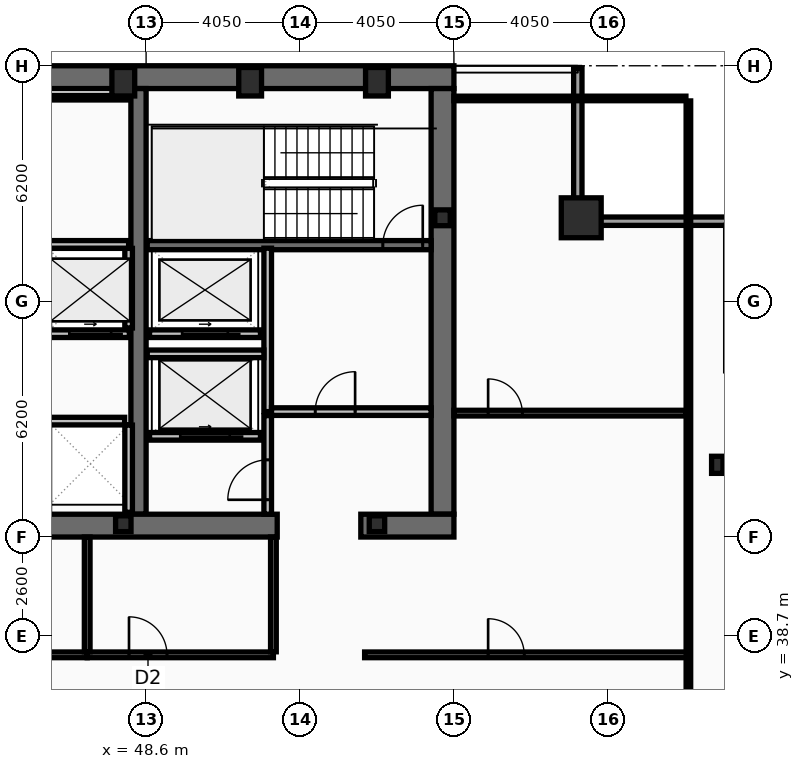
"""IFC4 building model, lengths in metres.
Left out: names, types, materials, properties, quantities, classifications, styles, units other than length and angle.
Written with IfcOpenShell. Run it as: python <this file> out.ifc"""

import sys

from ifc_helpers import new_model, si_unit, direction, frame, frame_2d, origin, origin_2d, place, context, subcontext, project, spatial, rectangle, hollow_rectangle, i_section, extrude, element, fill, save


model = new_model("IFC4")
c1 = context("Model", 3, precision=1e-05, world=origin(), true_north=direction((0.0, 1.0)))
c2 = subcontext(c1, "Body", "Model", "MODEL_VIEW")
j1 = project(units=[si_unit("LENGTHUNIT", "METRE"), si_unit("PLANEANGLEUNIT", "RADIAN")], contexts=[c1])
p1 = place(None, origin())
s1 = spatial("IfcSite", under=j1, at=p1, CompositionType="ELEMENT")
p2 = place(p1, origin())
s2 = spatial("IfcBuilding", under=s1, at=p2, CompositionType="ELEMENT")
p3 = place(p2, frame((0.0, 0.0, 253.4)))
s3 = spatial("IfcBuildingStorey", under=s2, at=p3, CompositionType="ELEMENT", Elevation=253.4)
p4 = place(p3, frame((16.2, 53.4, 0.0), z_axis=(0.0, 0.0, 1.0), x_axis=(1.0, 0.0, 0.0)))
e1 = element("IfcWall", 1, at=p4, inside=s3, PredefinedType="SHEAR", context=c2, shape_type="SweptSolid", body=[
    extrude(rectangle(XDim=40.5, YDim=0.6, at=frame_2d((20.25, 0.0))), origin(), (0.0, 0.0, 1.0), 3.38),
])
p5 = place(p3, frame((56.4, 53.1, 0.0), z_axis=(0.0, 0.0, 1.0), x_axis=(0.0, -1.0, 0.0)))
e2 = element("IfcWall", 2, at=p5, inside=s3, PredefinedType="SHEAR", context=c2, shape_type="SweptSolid", body=[
    extrude(rectangle(XDim=11.2, YDim=0.6, at=frame_2d((5.6, 0.0))), origin(), (0.0, 0.0, 1.0), 3.38),
])
p6 = place(p3, frame((48.4, 41.9, 0.0), z_axis=(0.0, 0.0, 1.0), x_axis=(0.0, 1.0, 0.0)))
e3 = element("IfcWall", 3, at=p6, inside=s3, PredefinedType="SHEAR", context=c2, shape_type="SweptSolid", body=[
    extrude(rectangle(XDim=11.2, YDim=0.4, at=frame_2d((5.6, 0.0))), origin(), (0.0, 0.0, 1.0), 3.38),
])
p7 = place(p3, frame((52.05, 41.6, 0.0), z_axis=(0.0, 0.0, 1.0), x_axis=(-1.0, 0.0, 0.0)))
e4 = element("IfcWall", 4, at=p7, inside=s3, PredefinedType="SHEAR", context=c2, shape_type="SweptSolid", body=[
    extrude(rectangle(XDim=11.3, YDim=0.6, at=frame_2d((5.65, 0.0))), origin(), (0.0, 0.0, 1.0), 3.38),
])
p8 = place(p3, frame((56.7, 41.6, 0.0), z_axis=(0.0, 0.0, 1.0), x_axis=(-1.0, 0.0, 0.0)))
e5 = element("IfcWall", 5, at=p8, inside=s3, PredefinedType="SHEAR", context=c2, shape_type="SweptSolid", body=[
    extrude(rectangle(XDim=2.45, YDim=0.6, at=frame_2d((1.225, 0.0))), origin(), (0.0, 0.0, 1.0), 3.38),
])
p9 = place(p3, frame((48.63, 48.98, 0.0), z_axis=(0.0, 0.0, 1.0), x_axis=(1.0, 0.0, 0.0)))
e6 = element("IfcWall", 6, at=p9, inside=s3, PredefinedType="SHEAR", context=c2, shape_type="SweptSolid", body=[
    extrude(rectangle(XDim=7.47, YDim=0.24, at=frame_2d((3.735, 0.0))), origin(), (0.0, 0.0, 1.0), 3.38),
])
p10 = place(p9, frame((6.2, 0.0, 0.0)))
e7 = element("IfcOpeningElement", 7, at=p10, cuts=e6, PredefinedType="OPENING", context=c2, shape_type="SweptSolid", body=[
    extrude(rectangle(XDim=1.05, YDim=2.15, at=frame_2d((0.525, 1.075))), frame((0.0, 0.13, 0.0), z_axis=(0.0, -1.0, 0.0), x_axis=(1.0, 0.0, 0.0)), (0.0, 0.0, 1.0), 0.26),
])
p11 = place(p3, frame((60.05, 49.7, 0.0), z_axis=(0.0, 0.0, 1.0), x_axis=(1.0, 0.0, 0.0)))
e8 = element("IfcColumn", 8, at=p11, inside=s3, PredefinedType="COLUMN", context=c2, shape_type="SweptSolid", body=[
    extrude(hollow_rectangle(XDim=1.05, YDim=1.05, WallThickness=0.055, at=origin_2d()), origin(), (0.0, 0.0, 1.0), 3.6),
])
for number, where, z_axis, x_axis in (
    (9, (48.0, 53.28, 0.0), (0.0, 0.0, 1.0), (1.0, 0.0, 0.0)),
    (10, (51.337, 53.28, 0.0), (0.0, 0.0, 1.0), (1.0, 0.0, 0.0)),
    (11, (54.675, 53.28, 0.0), (0.0, 0.0, 1.0), (1.0, 0.0, 0.0)),
):
    element("IfcColumn", number, at=place(p3, frame(where, z_axis=z_axis, x_axis=x_axis)), inside=s3, PredefinedType="COLUMN", context=c2, shape_type="SweptSolid", body=[
        extrude(hollow_rectangle(XDim=0.6, YDim=0.75, WallThickness=0.045, at=origin_2d()), origin(), (0.0, 0.0, 1.0), 3.6),
    ])
p12 = place(p3, frame((63.63, 43.2, 0.0), z_axis=(0.0, 0.0, 1.0), x_axis=(1.0, 0.0, 0.0)))
e12 = element("IfcColumn", 12, at=p12, inside=s3, PredefinedType="COLUMN", context=c2, shape_type="SweptSolid", body=[
    extrude(i_section(OverallWidth=0.3, OverallDepth=0.45, WebThickness=0.014, FlangeThickness=0.026, at=origin_2d()), origin(), (0.0, 0.0, 1.0), 3.6),
])
for number, where, z_axis, x_axis in (
    (13, (56.4, 49.7, 0.0), (0.0, 0.0, 1.0), (1.0, 0.0, 0.0)),
    (14, (48.0, 41.65, 0.0), (0.0, 0.0, 1.0), (1.0, 0.0, 0.0)),
    (15, (54.675, 41.65, 0.0), (0.0, 0.0, 1.0), (1.0, 0.0, 0.0)),
):
    element("IfcColumn", number, at=place(p3, frame(where, z_axis=z_axis, x_axis=x_axis)), inside=s3, PredefinedType="COLUMN", context=c2, shape_type="SweptSolid", body=[
        extrude(i_section(OverallWidth=0.406, OverallDepth=0.416, WebThickness=0.03, FlangeThickness=0.048, at=origin_2d()), origin(), (0.0, 0.0, 1.0), 3.6),
    ])
p13 = place(p3, frame((59.96, 53.63, 0.0), z_axis=(0.0, 0.0, 1.0), x_axis=(0.0, -1.0, 0.0)))
e16 = element("IfcWall", 16, at=p13, inside=s3, PredefinedType="SOLIDWALL", context=c2, shape_type="SweptSolid", body=[
    extrude(rectangle(XDim=3.91, YDim=0.22, at=frame_2d((1.955, 0.0))), origin(), (0.0, 0.0, 1.0), 2.77),
])
p14 = place(p3, frame((59.85, 49.61, 0.0), z_axis=(0.0, 0.0, 1.0), x_axis=(1.0, 0.0, 0.0)))
e17 = element("IfcWall", 17, at=p14, inside=s3, PredefinedType="SOLIDWALL", context=c2, shape_type="SweptSolid", body=[
    extrude(rectangle(XDim=4.22, YDim=0.22, at=frame_2d((2.11, 0.0))), origin(), (0.0, 0.0, 1.0), 2.77),
])
p15 = place(p3, frame((51.61, 43.95, 0.0), z_axis=(0.0, 0.0, 1.0), x_axis=(-1.0, 0.0, 0.0)))
e18 = element("IfcWall", 18, at=p15, inside=s3, PredefinedType="PARTITIONING", context=c2, shape_type="SweptSolid", body=[
    extrude(rectangle(XDim=2.92, YDim=0.2, at=frame_2d((1.46, 0.0))), origin(), (0.0, 0.0, 1.0), 3.38),
])
p16 = place(p15, frame((0.81, 0.0, 0.0)))
e19 = element("IfcOpeningElement", 19, at=p16, cuts=e18, PredefinedType="OPENING", context=c2, shape_type="SweptSolid", body=[
    extrude(rectangle(XDim=1.3, YDim=2.18, at=frame_2d((0.65, 1.09))), frame((0.0, 0.11, 0.0), z_axis=(0.0, -1.0, 0.0), x_axis=(1.0, 0.0, 0.0)), (0.0, 0.0, 1.0), 0.22),
])
p17 = place(p3, frame((51.61, 46.65, 0.0), z_axis=(0.0, 0.0, 1.0), x_axis=(-1.0, 0.0, 0.0)))
e20 = element("IfcWall", 20, at=p17, inside=s3, PredefinedType="PARTITIONING", context=c2, shape_type="SweptSolid", body=[
    extrude(rectangle(XDim=2.92, YDim=0.2, at=frame_2d((1.46, 0.0))), origin(), (0.0, 0.0, 1.0), 3.38),
])
p18 = place(p17, frame((0.86, 0.0, 0.0)))
e21 = element("IfcOpeningElement", 21, at=p18, cuts=e20, PredefinedType="OPENING", context=c2, shape_type="SweptSolid", body=[
    extrude(rectangle(XDim=1.2, YDim=2.18, at=frame_2d((0.6, 1.09))), frame((0.0, 0.11, 0.0), z_axis=(0.0, -1.0, 0.0), x_axis=(1.0, 0.0, 0.0)), (0.0, 0.0, 1.0), 0.22),
])
p19 = place(p3, frame((48.16, 46.65, 0.0), z_axis=(0.0, 0.0, 1.0), x_axis=(-1.0, 0.0, 0.0)))
e22 = element("IfcWall", 22, at=p19, inside=s3, PredefinedType="PARTITIONING", context=c2, shape_type="SweptSolid", body=[
    extrude(rectangle(XDim=6.48, YDim=0.2, at=frame_2d((3.24, 0.0))), origin(), (0.0, 0.0, 1.0), 3.38),
])
p20 = place(p19, frame((4.8, 0.0, 0.0)))
e23 = element("IfcOpeningElement", 23, at=p20, cuts=e22, PredefinedType="OPENING", context=c2, shape_type="SweptSolid", body=[
    extrude(rectangle(XDim=1.1, YDim=2.18, at=frame_2d((0.55, 1.09))), frame((0.0, 0.11, 0.0), z_axis=(0.0, -1.0, 0.0), x_axis=(1.0, 0.0, 0.0)), (0.0, 0.0, 1.0), 0.22),
])
p21 = place(p19, frame((2.64, 0.0, 0.0)))
e24 = element("IfcOpeningElement", 24, at=p21, cuts=e22, PredefinedType="OPENING", context=c2, shape_type="SweptSolid", body=[
    extrude(rectangle(XDim=1.1, YDim=2.18, at=frame_2d((0.55, 1.09))), frame((0.0, 0.11, 0.0), z_axis=(0.0, -1.0, 0.0), x_axis=(1.0, 0.0, 0.0)), (0.0, 0.0, 1.0), 0.22),
])
p22 = place(p19, frame((0.48, 0.0, 0.0)))
e25 = element("IfcOpeningElement", 25, at=p22, cuts=e22, PredefinedType="OPENING", context=c2, shape_type="SweptSolid", body=[
    extrude(rectangle(XDim=1.1, YDim=2.18, at=frame_2d((0.55, 1.09))), frame((0.0, 0.11, 0.0), z_axis=(0.0, -1.0, 0.0), x_axis=(1.0, 0.0, 0.0)), (0.0, 0.0, 1.0), 0.22),
])
p23 = place(p3, frame((51.8, 44.6, 0.0), z_axis=(0.0, 0.0, 1.0), x_axis=(0.0, 1.0, 0.0)))
e26 = element("IfcWall", 26, at=p23, inside=s3, PredefinedType="PARTITIONING", context=c2, shape_type="SweptSolid", body=[
    extrude(rectangle(XDim=4.3, YDim=0.2, at=frame_2d((2.15, 0.0))), origin(), (0.0, 0.0, 1.0), 3.38),
])
p24 = place(p3, frame((51.9, 44.6, 0.0), z_axis=(0.0, 0.0, 1.0), x_axis=(1.0, 0.0, 0.0)))
e27 = element("IfcWall", 27, at=p24, inside=s3, PredefinedType="PARTITIONING", context=c2, shape_type="SweptSolid", body=[
    extrude(rectangle(XDim=4.2, YDim=0.2, at=frame_2d((2.1, 0.0))), origin(), (0.0, 0.0, 1.0), 3.38),
])
p25 = place(p24, frame((1.15, 0.0, 0.0)))
e28 = element("IfcOpeningElement", 28, at=p25, cuts=e27, PredefinedType="OPENING", context=c2, shape_type="SweptSolid", body=[
    extrude(rectangle(XDim=1.05, YDim=2.15, at=frame_2d((0.525, 1.075))), frame((0.0, 0.11, 0.0), z_axis=(0.0, -1.0, 0.0), x_axis=(1.0, 0.0, 0.0)), (0.0, 0.0, 1.0), 0.22),
])
p26 = place(p3, frame((48.63, 46.12, 0.0), z_axis=(0.0, 0.0, 1.0), x_axis=(1.0, 0.0, 0.0)))
e29 = element("IfcWall", 29, at=p26, inside=s3, PredefinedType="PARTITIONING", context=c2, shape_type="SweptSolid", body=[
    extrude(rectangle(XDim=3.07, YDim=0.2, at=frame_2d((1.535, 0.0))), origin(), (0.0, 0.0, 1.0), 3.38),
])
p27 = place(p3, frame((51.8, 41.9, 0.0), z_axis=(0.0, 0.0, 1.0), x_axis=(0.0, 1.0, 0.0)))
e30 = element("IfcWall", 30, at=p27, inside=s3, PredefinedType="PARTITIONING", context=c2, shape_type="SweptSolid", body=[
    extrude(rectangle(XDim=2.595, YDim=0.2, at=frame_2d((1.298, 0.0))), origin(), (0.0, 0.0, 1.0), 3.38),
])
p28 = place(p27, frame((0.38, 0.0, 0.0)))
e31 = element("IfcOpeningElement", 31, at=p28, cuts=e30, PredefinedType="OPENING", context=c2, shape_type="SweptSolid", body=[
    extrude(rectangle(XDim=1.05, YDim=2.15, at=frame_2d((0.525, 1.075))), frame((0.0, 0.11, 0.0), z_axis=(0.0, -1.0, 0.0), x_axis=(1.0, 0.0, 0.0)), (0.0, 0.0, 1.0), 0.22),
])
p29 = place(p3, frame((48.14, 46.8, 0.0), z_axis=(0.0, 0.0, 1.0), x_axis=(0.0, 1.0, 0.0)))
e32 = element("IfcWall", 32, at=p29, inside=s3, PredefinedType="PARTITIONING", context=c2, shape_type="SweptSolid", body=[
    extrude(rectangle(XDim=2.095, YDim=0.2, at=frame_2d((1.047, 0.0))), origin(), (0.0, 0.0, 1.0), 3.38),
])
p30 = place(p3, frame((41.825, 44.35, 0.0), z_axis=(0.0, 0.0, 1.0), x_axis=(1.0, 0.0, 0.0)))
e33 = element("IfcWall", 33, at=p30, inside=s3, PredefinedType="PARTITIONING", context=c2, shape_type="SweptSolid", body=[
    extrude(rectangle(XDim=6.21, YDim=0.2, at=frame_2d((3.105, 0.0))), origin(), (0.0, 0.0, 1.0), 3.38),
])
p31 = place(p3, frame((48.14, 41.95, 0.0), z_axis=(0.0, 0.0, 1.0), x_axis=(0.0, 1.0, 0.0)))
e34 = element("IfcWall", 34, at=p31, inside=s3, PredefinedType="PARTITIONING", context=c2, shape_type="SweptSolid", body=[
    extrude(rectangle(XDim=2.295, YDim=0.2, at=frame_2d((1.147, 0.0))), origin(), (0.0, 0.0, 1.0), 3.38),
])
p32 = place(p3, frame((40.58, 52.86, 0.0), z_axis=(0.0, 0.0, 1.0), x_axis=(1.0, 0.0, 0.0)))
e35 = element("IfcWall", 35, at=p32, inside=s3, PredefinedType="PARTITIONING", context=c2, shape_type="SweptSolid", body=[
    extrude(rectangle(XDim=7.56, YDim=0.12, at=frame_2d((3.78, 0.0))), origin(), (0.0, 0.0, 1.0), 3.38),
])
p33 = place(p3, frame((40.58, 49.0, 0.0), z_axis=(0.0, 0.0, 1.0), x_axis=(1.0, 0.0, 0.0)))
e36 = element("IfcWall", 36, at=p33, inside=s3, PredefinedType="PARTITIONING", context=c2, shape_type="SweptSolid", body=[
    extrude(rectangle(XDim=7.56, YDim=0.2, at=frame_2d((3.78, 0.0))), origin(), (0.0, 0.0, 1.0), 3.38),
])
p34 = place(p33, frame((0.16, 0.0, 0.0)))
e37 = element("IfcOpeningElement", 37, at=p34, cuts=e36, PredefinedType="OPENING", context=c2, shape_type="SweptSolid", body=[
    extrude(rectangle(XDim=0.95, YDim=2.1, at=frame_2d((0.475, 1.05))), frame((0.0, 0.11, 0.0), z_axis=(0.0, -1.0, 0.0), x_axis=(1.0, 0.0, 0.0)), (0.0, 0.0, 1.0), 0.22),
])
p35 = place(p3, frame((40.88, 38.2, 0.0), z_axis=(0.0, 0.0, 1.0), x_axis=(1.0, 0.0, 0.0)))
e38 = element("IfcWall", 38, at=p35, inside=s3, PredefinedType="PARTITIONING", context=c2, shape_type="SweptSolid", body=[
    extrude(rectangle(XDim=6.17, YDim=0.15, at=frame_2d((3.085, 0.0))), origin(), (0.0, 0.0, 1.0), 2.72),
])
p36 = place(p35, frame((1.1, 0.0, 0.0)))
e39 = element("IfcOpeningElement", 39, at=p36, cuts=e38, PredefinedType="OPENING", context=c2, shape_type="SweptSolid", body=[
    extrude(rectangle(XDim=0.9, YDim=2.05, at=frame_2d((0.45, 1.025))), frame((0.0, 0.085, 0.0), z_axis=(0.0, -1.0, 0.0), x_axis=(1.0, 0.0, 0.0)), (0.0, 0.0, 1.0), 0.17),
])
p37 = place(p3, frame((47.05, 38.2, 0.0), z_axis=(0.0, 0.0, 1.0), x_axis=(1.0, 0.0, 0.0)))
e40 = element("IfcWall", 40, at=p37, inside=s3, PredefinedType="PARTITIONING", context=c2, shape_type="SweptSolid", body=[
    extrude(rectangle(XDim=4.9, YDim=0.15, at=frame_2d((2.45, 0.0))), origin(), (0.0, 0.0, 1.0), 2.72),
])
p38 = place(p37, frame((1.1, 0.0, 0.0)))
e41 = element("IfcOpeningElement", 41, at=p38, cuts=e40, PredefinedType="OPENING", context=c2, shape_type="SweptSolid", body=[
    extrude(rectangle(XDim=1.0, YDim=2.05, at=frame_2d((0.5, 1.025))), frame((0.0, 0.085, 0.0), z_axis=(0.0, -1.0, 0.0), x_axis=(1.0, 0.0, 0.0)), (0.0, 0.0, 1.0), 0.17),
])
for number, where, z_axis, x_axis in (
    (42, (47.05, 38.28, 0.0), (0.0, 0.0, 1.0), (0.0, 1.0, 0.0)),
    (43, (51.95, 38.28, 0.0), (0.0, 0.0, 1.0), (0.0, 1.0, 0.0)),
):
    element("IfcWall", number, at=place(p3, frame(where, z_axis=z_axis, x_axis=x_axis)), inside=s3, PredefinedType="PARTITIONING", context=c2, shape_type="SweptSolid", body=[
        extrude(rectangle(XDim=3.02, YDim=0.15, at=frame_2d((1.51, 0.0))), origin(), (0.0, 0.0, 1.0), 3.38),
    ])
p39 = place(p3, frame((54.35, 38.2, 0.0), z_axis=(0.0, 0.0, 1.0), x_axis=(1.0, 0.0, 0.0)))
e44 = element("IfcWall", 44, at=p39, inside=s3, PredefinedType="PARTITIONING", context=c2, shape_type="SweptSolid", body=[
    extrude(rectangle(XDim=8.52, YDim=0.15, at=frame_2d((4.26, 0.0))), origin(), (0.0, 0.0, 1.0), 2.72),
])
p40 = place(p39, frame((3.25, 0.0, 0.0)))
e45 = element("IfcOpeningElement", 45, at=p40, cuts=e44, PredefinedType="OPENING", context=c2, shape_type="SweptSolid", body=[
    extrude(rectangle(XDim=0.95, YDim=2.05, at=frame_2d((0.475, 1.025))), frame((0.0, 0.085, 0.0), z_axis=(0.0, -1.0, 0.0), x_axis=(1.0, 0.0, 0.0)), (0.0, 0.0, 1.0), 0.17),
])
p41 = place(p3, frame((56.7, 44.56, 0.0), z_axis=(0.0, 0.0, 1.0), x_axis=(1.0, 0.0, 0.0)))
e46 = element("IfcWall", 46, at=p41, inside=s3, PredefinedType="PARTITIONING", context=c2, shape_type="SweptSolid", body=[
    extrude(rectangle(XDim=6.105, YDim=0.15, at=frame_2d((3.052, 0.0))), origin(), (0.0, 0.0, 1.0), 2.77),
])
p42 = place(p41, frame((0.9, 0.0, 0.0)))
e47 = element("IfcOpeningElement", 47, at=p42, cuts=e46, PredefinedType="OPENING", context=c2, shape_type="SweptSolid", body=[
    extrude(rectangle(XDim=0.9, YDim=2.05, at=frame_2d((0.45, 1.025))), frame((0.0, 0.085, 0.0), z_axis=(0.0, -1.0, 0.0), x_axis=(1.0, 0.0, 0.0)), (0.0, 0.0, 1.0), 0.17),
])
p43 = place(p3, frame((62.87, 10.665, 0.0), z_axis=(0.0, 0.0, 1.0), x_axis=(0.0, 1.0, 0.0)))
e48 = element("IfcWall", 48, at=p43, inside=s3, PredefinedType="PARTITIONING", context=c2, shape_type="SweptSolid", body=[
    extrude(rectangle(XDim=42.11, YDim=0.12, at=frame_2d((21.055, 0.0))), origin(), (0.0, 0.0, 1.0), 2.72),
])
p44 = place(p3, frame((56.7, 52.84, 0.0), z_axis=(0.0, 0.0, 1.0), x_axis=(1.0, 0.0, 0.0)))
e49 = element("IfcWall", 49, at=p44, inside=s3, PredefinedType="PARTITIONING", context=c2, shape_type="SweptSolid", body=[
    extrude(rectangle(XDim=6.105, YDim=0.12, at=frame_2d((3.052, 0.0))), origin(), (0.0, 0.0, 1.0), 3.38),
])
p45 = place(p10, origin())
e50 = element("IfcDoor", 50, at=p45, inside=s3, OperationType="SINGLE_SWING_RIGHT", PredefinedType="DOOR", context=c2, shape_type="SweptSolid", body=[
    extrude(rectangle(XDim=1.05, YDim=2.15, at=frame_2d((0.525, 1.075))), frame((0.0, 0.025, 0.0), z_axis=(0.0, -1.0, 0.0), x_axis=(1.0, 0.0, 0.0)), (0.0, 0.0, 1.0), 0.05),
])
fill(e7, e50)
p46 = place(p16, origin())
e51 = element("IfcDoor", 51, at=p46, inside=s3, OperationType="SLIDING_TO_LEFT", PredefinedType="DOOR", context=c2, shape_type="SweptSolid", body=[
    extrude(rectangle(XDim=1.3, YDim=2.18, at=frame_2d((0.65, 1.09))), frame((0.0, 0.025, 0.0), z_axis=(0.0, -1.0, 0.0), x_axis=(1.0, 0.0, 0.0)), (0.0, 0.0, 1.0), 0.05),
])
fill(e19, e51)
p47 = place(p18, origin())
e52 = element("IfcDoor", 52, at=p47, inside=s3, OperationType="SLIDING_TO_LEFT", PredefinedType="DOOR", context=c2, shape_type="SweptSolid", body=[
    extrude(rectangle(XDim=1.2, YDim=2.18, at=frame_2d((0.6, 1.09))), frame((0.0, 0.025, 0.0), z_axis=(0.0, -1.0, 0.0), x_axis=(1.0, 0.0, 0.0)), (0.0, 0.0, 1.0), 0.05),
])
fill(e21, e52)
p48 = place(p22, origin())
e53 = element("IfcDoor", 53, at=p48, inside=s3, OperationType="SLIDING_TO_LEFT", PredefinedType="DOOR", context=c2, shape_type="SweptSolid", body=[
    extrude(rectangle(XDim=1.1, YDim=2.18, at=frame_2d((0.55, 1.09))), frame((0.0, 0.025, 0.0), z_axis=(0.0, -1.0, 0.0), x_axis=(1.0, 0.0, 0.0)), (0.0, 0.0, 1.0), 0.05),
])
fill(e25, e53)
p49 = place(p25, origin())
e54 = element("IfcDoor", 54, at=p49, inside=s3, OperationType="SINGLE_SWING_RIGHT", PredefinedType="DOOR", context=c2, shape_type="SweptSolid", body=[
    extrude(rectangle(XDim=1.05, YDim=2.15, at=frame_2d((0.525, 1.075))), frame((0.0, 0.025, 0.0), z_axis=(0.0, -1.0, 0.0), x_axis=(1.0, 0.0, 0.0)), (0.0, 0.0, 1.0), 0.05),
])
fill(e28, e54)
p50 = place(p28, origin())
e55 = element("IfcDoor", 55, at=p50, inside=s3, OperationType="SINGLE_SWING_LEFT", PredefinedType="DOOR", context=c2, shape_type="SweptSolid", body=[
    extrude(rectangle(XDim=1.05, YDim=2.15, at=frame_2d((0.525, 1.075))), frame((0.0, 0.025, 0.0), z_axis=(0.0, -1.0, 0.0), x_axis=(1.0, 0.0, 0.0)), (0.0, 0.0, 1.0), 0.05),
])
fill(e31, e55)
p51 = place(p38, origin())
e56 = element("IfcDoor", 56, at=p51, inside=s3, OperationType="SINGLE_SWING_LEFT", PredefinedType="DOOR", context=c2, shape_type="SweptSolid", body=[
    extrude(rectangle(XDim=1.0, YDim=2.05, at=frame_2d((0.5, 1.025))), frame((0.0, 0.025, 0.0), z_axis=(0.0, -1.0, 0.0), x_axis=(1.0, 0.0, 0.0)), (0.0, 0.0, 1.0), 0.05),
])
fill(e41, e56)
p52 = place(p40, origin())
e57 = element("IfcDoor", 57, at=p52, inside=s3, OperationType="SINGLE_SWING_LEFT", PredefinedType="DOOR", context=c2, shape_type="SweptSolid", body=[
    extrude(rectangle(XDim=0.95, YDim=2.05, at=frame_2d((0.475, 1.025))), frame((0.0, 0.025, 0.0), z_axis=(0.0, -1.0, 0.0), x_axis=(1.0, 0.0, 0.0)), (0.0, 0.0, 1.0), 0.05),
])
fill(e45, e57)
p53 = place(p42, origin())
e58 = element("IfcDoor", 58, at=p53, inside=s3, OperationType="SINGLE_SWING_LEFT", PredefinedType="DOOR", context=c2, shape_type="SweptSolid", body=[
    extrude(rectangle(XDim=0.9, YDim=2.05, at=frame_2d((0.45, 1.025))), frame((0.0, 0.025, 0.0), z_axis=(0.0, -1.0, 0.0), x_axis=(1.0, 0.0, 0.0)), (0.0, 0.0, 1.0), 0.05),
])
fill(e47, e58)
save(model, sys.argv[1])
